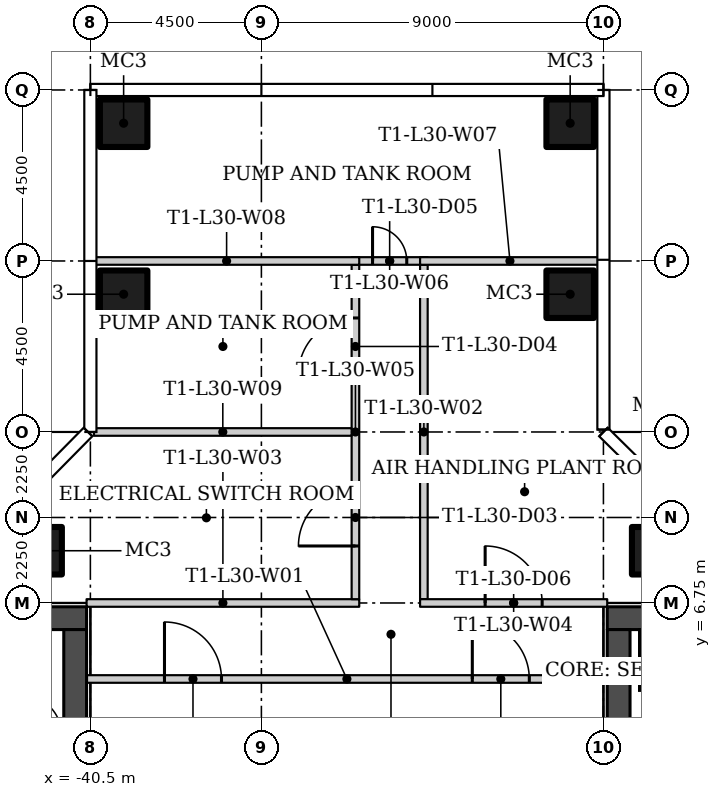
"""IFC4 building model, lengths in metres.
Left out: names, types, materials, properties, quantities, classifications, styles, units other than length and angle.
Written with IfcOpenShell. Run it as: python <this file> out.ifc"""

import sys

from ifc_helpers import new_model, si_unit, direction, frame, frame_2d, origin, origin_2d, place, context, subcontext, project, spatial, rectangle, hollow_rectangle, extrude, element, fill, save


model = new_model("IFC4")
c1 = context("Model", 3, precision=1e-05, world=origin(), true_north=direction((0.0, 1.0)))
c2 = subcontext(c1, "Body", "Model", "MODEL_VIEW")
j1 = project(units=[si_unit("LENGTHUNIT", "METRE"), si_unit("PLANEANGLEUNIT", "RADIAN")], contexts=[c1])
p1 = place(None, origin())
s1 = spatial("IfcSite", under=j1, at=p1, CompositionType="ELEMENT")
p2 = place(p1, origin())
s2 = spatial("IfcBuilding", under=s1, at=p2, CompositionType="ELEMENT")
p3 = place(p2, frame((0.0, 0.0, 128.7)))
s3 = spatial("IfcBuildingStorey", under=s2, at=p3, CompositionType="ELEMENT", Elevation=128.7)
for number, where in (
    (1, (-25.625, 8.125, 0.0)),
    (2, (-41.875, 8.125, 0.0)),
    (3, (-39.625, 14.875, 0.0)),
    (4, (-39.625, 19.375, 0.0)),
    (5, (-27.875, 14.875, 0.0)),
    (6, (-27.875, 19.375, 0.0)),
):
    element("IfcColumn", number, at=place(p3, frame(where)), inside=s3, PredefinedType="COLUMN", context=c2, shape_type="SweptSolid", body=[
        extrude(hollow_rectangle(XDim=1.25, YDim=1.25, WallThickness=0.05, at=origin_2d()), origin(), (0.0, 0.0, 1.0), 4.4),
    ])
p4 = place(p3, frame((-40.6, 4.75, 0.0)))
e7 = element("IfcWall", 7, at=p4, inside=s3, PredefinedType="PARTITIONING", context=c2, shape_type="SweptSolid", body=[
    extrude(rectangle(XDim=13.7, YDim=0.2, at=frame_2d((6.85, 0.0))), origin(), (0.0, 0.0, 1.0), 4.4),
])
p5 = place(p4, frame((2.05, 0.0, 0.0)))
e8 = element("IfcOpeningElement", 8, at=p5, cuts=e7, PredefinedType="OPENING", context=c2, shape_type="SweptSolid", body=[
    extrude(rectangle(XDim=1.5, YDim=2.4, at=frame_2d((0.75, 1.2))), frame((0.0, 0.11, 0.0), z_axis=(0.0, -1.0, 0.0), x_axis=(1.0, 0.0, 0.0)), (0.0, 0.0, 1.0), 0.22),
])
p6 = place(p4, frame((10.15, 0.0, 0.0)))
e9 = element("IfcOpeningElement", 9, at=p6, cuts=e7, PredefinedType="OPENING", context=c2, shape_type="SweptSolid", body=[
    extrude(rectangle(XDim=1.5, YDim=2.4, at=frame_2d((0.75, 1.2))), frame((0.0, 0.11, 0.0), z_axis=(0.0, -1.0, 0.0), x_axis=(1.0, 0.0, 0.0)), (0.0, 0.0, 1.0), 0.22),
])
p7 = place(p3, frame((-31.725, 15.65, 0.0), z_axis=(0.0, 0.0, 1.0), x_axis=(0.0, -1.0, 0.0)))
e10 = element("IfcWall", 10, at=p7, inside=s3, PredefinedType="PARTITIONING", context=c2, shape_type="SweptSolid", body=[
    extrude(rectangle(XDim=8.8, YDim=0.2, at=frame_2d((4.4, 0.0))), origin(), (0.0, 0.0, 1.0), 4.4),
])
p8 = place(p3, frame((-40.6, 6.75, 0.0)))
e11 = element("IfcWall", 11, at=p8, inside=s3, PredefinedType="PARTITIONING", context=c2, shape_type="SweptSolid", body=[
    extrude(rectangle(XDim=7.175, YDim=0.2, at=frame_2d((3.587, 0.0))), origin(), (0.0, 0.0, 1.0), 4.4),
])
p9 = place(p3, frame((-31.825, 6.75, 0.0)))
e12 = element("IfcWall", 12, at=p9, inside=s3, PredefinedType="PARTITIONING", context=c2, shape_type="SweptSolid", body=[
    extrude(rectangle(XDim=4.925, YDim=0.2, at=frame_2d((2.462, 0.0))), origin(), (0.0, 0.0, 1.0), 4.4),
])
p10 = place(p9, frame((1.712, 0.0, 0.0)))
e13 = element("IfcOpeningElement", 13, at=p10, cuts=e12, PredefinedType="OPENING", context=c2, shape_type="SweptSolid", body=[
    extrude(rectangle(XDim=1.5, YDim=2.4, at=frame_2d((0.75, 1.2))), frame((0.0, 0.11, 0.0), z_axis=(0.0, -1.0, 0.0), x_axis=(1.0, 0.0, 0.0)), (0.0, 0.0, 1.0), 0.22),
])
p11 = place(p3, frame((-33.525, 6.85, 0.0), z_axis=(0.0, 0.0, 1.0), x_axis=(0.0, 1.0, 0.0)))
e14 = element("IfcWall", 14, at=p11, inside=s3, PredefinedType="PARTITIONING", context=c2, shape_type="SweptSolid", body=[
    extrude(rectangle(XDim=8.8, YDim=0.2, at=frame_2d((4.4, 0.0))), origin(), (0.0, 0.0, 1.0), 4.4),
])
p12 = place(p11, frame((1.4, 0.0, 0.0)))
e15 = element("IfcOpeningElement", 15, at=p12, cuts=e14, PredefinedType="OPENING", context=c2, shape_type="SweptSolid", body=[
    extrude(rectangle(XDim=1.5, YDim=2.4, at=frame_2d((0.75, 1.2))), frame((0.0, 0.11, 0.0), z_axis=(0.0, -1.0, 0.0), x_axis=(1.0, 0.0, 0.0)), (0.0, 0.0, 1.0), 0.22),
])
p13 = place(p11, frame((5.9, 0.0, 0.0)))
e16 = element("IfcOpeningElement", 16, at=p13, cuts=e14, PredefinedType="OPENING", context=c2, shape_type="SweptSolid", body=[
    extrude(rectangle(XDim=1.5, YDim=2.4, at=frame_2d((0.75, 1.2))), frame((0.0, 0.11, 0.0), z_axis=(0.0, -1.0, 0.0), x_axis=(1.0, 0.0, 0.0)), (0.0, 0.0, 1.0), 0.22),
])
p14 = place(p3, frame((-33.625, 15.75, 0.0)))
e17 = element("IfcWall", 17, at=p14, inside=s3, PredefinedType="PARTITIONING", context=c2, shape_type="SweptSolid", body=[
    extrude(rectangle(XDim=2.001, YDim=0.2, at=frame_2d((1.0, 0.0))), origin(), (0.0, 0.0, 1.0), 4.4),
])
p15 = place(p14, frame((0.55, 0.0, 0.0)))
e18 = element("IfcOpeningElement", 18, at=p15, cuts=e17, PredefinedType="OPENING", context=c2, shape_type="SweptSolid", body=[
    extrude(rectangle(XDim=0.9, YDim=2.4, at=frame_2d((0.45, 1.2))), frame((0.0, 0.11, 0.0), z_axis=(0.0, -1.0, 0.0), x_axis=(1.0, 0.0, 0.0)), (0.0, 0.0, 1.0), 0.22),
])
p16 = place(p3, frame((-27.095, 15.75, 0.0), z_axis=(0.0, 0.0, 1.0), x_axis=(-1.0, 0.0, 0.0)))
e19 = element("IfcWall", 19, at=p16, inside=s3, PredefinedType="PARTITIONING", context=c2, shape_type="SweptSolid", body=[
    extrude(rectangle(XDim=4.73, YDim=0.2, at=frame_2d((2.365, 0.0))), origin(), (0.0, 0.0, 1.0), 4.4),
])
p17 = place(p3, frame((-33.425, 15.75, 0.0), z_axis=(0.0, 0.0, 1.0), x_axis=(-1.0, 0.0, 0.0)))
e20 = element("IfcWall", 20, at=p17, inside=s3, PredefinedType="PARTITIONING", context=c2, shape_type="SweptSolid", body=[
    extrude(rectangle(XDim=6.98, YDim=0.2, at=frame_2d((3.49, 0.0))), origin(), (0.0, 0.0, 1.0), 4.4),
])
p18 = place(p3, frame((-33.625, 11.25, 0.0), z_axis=(0.0, 0.0, 1.0), x_axis=(-1.0, 0.0, 0.0)))
e21 = element("IfcWall", 21, at=p18, inside=s3, PredefinedType="PARTITIONING", context=c2, shape_type="SweptSolid", body=[
    extrude(rectangle(XDim=6.78, YDim=0.2, at=frame_2d((3.39, 0.0))), origin(), (0.0, 0.0, 1.0), 4.4),
])
p19 = place(p3, frame((-26.9, 6.35, 0.0)))
e22 = element("IfcWall", 22, at=p19, inside=s3, PredefinedType="SHEAR", context=c2, shape_type="SweptSolid", body=[
    extrude(rectangle(XDim=13.3, YDim=0.6, at=frame_2d((6.65, 0.0))), origin(), (0.0, 0.0, 1.0), 4.4),
])
p20 = place(p3, frame((-26.6, 6.05, 0.0), z_axis=(0.0, 0.0, 1.0), x_axis=(0.0, -1.0, 0.0)))
e23 = element("IfcWall", 23, at=p20, inside=s3, PredefinedType="SHEAR", context=c2, shape_type="SweptSolid", body=[
    extrude(rectangle(XDim=12.1, YDim=0.6, at=frame_2d((6.05, 0.0))), origin(), (0.0, 0.0, 1.0), 4.4),
])
p21 = place(p20, frame((7.45, 0.0, 0.0)))
e24 = element("IfcOpeningElement", 24, at=p21, cuts=e23, PredefinedType="OPENING", context=c2, shape_type="SweptSolid", body=[
    extrude(rectangle(XDim=1.2, YDim=2.1, at=frame_2d((0.6, 1.05))), frame((0.0, 0.31, 0.0), z_axis=(0.0, -1.0, 0.0), x_axis=(1.0, 0.0, 0.0)), (0.0, 0.0, 1.0), 0.62),
])
p22 = place(p20, frame((3.9, 0.0, 0.0)))
e25 = element("IfcOpeningElement", 25, at=p22, cuts=e23, PredefinedType="OPENING", context=c2, shape_type="SweptSolid", body=[
    extrude(rectangle(XDim=1.8, YDim=2.4, at=frame_2d((0.9, 1.2))), frame((0.0, 0.31, 0.0), z_axis=(0.0, -1.0, 0.0), x_axis=(1.0, 0.0, 0.0)), (0.0, 0.0, 1.0), 0.62),
])
p23 = place(p3, frame((-40.6, 6.35, 0.0), z_axis=(0.0, 0.0, 1.0), x_axis=(-1.0, 0.0, 0.0)))
e26 = element("IfcWall", 26, at=p23, inside=s3, PredefinedType="SHEAR", context=c2, shape_type="SweptSolid", body=[
    extrude(rectangle(XDim=13.3, YDim=0.6, at=frame_2d((6.65, 0.0))), origin(), (0.0, 0.0, 1.0), 4.4),
])
p24 = place(p3, frame((-40.9, -6.05, 0.0), z_axis=(0.0, 0.0, 1.0), x_axis=(0.0, 1.0, 0.0)))
e27 = element("IfcWall", 27, at=p24, inside=s3, PredefinedType="SHEAR", context=c2, shape_type="SweptSolid", body=[
    extrude(rectangle(XDim=12.1, YDim=0.6, at=frame_2d((6.05, 0.0))), origin(), (0.0, 0.0, 1.0), 4.4),
])
p25 = place(p24, frame((3.45, 0.0, 0.0)))
e28 = element("IfcOpeningElement", 28, at=p25, cuts=e27, PredefinedType="OPENING", context=c2, shape_type="SweptSolid", body=[
    extrude(rectangle(XDim=1.2, YDim=2.1, at=frame_2d((0.6, 1.05))), frame((0.0, 0.31, 0.0), z_axis=(0.0, -1.0, 0.0), x_axis=(1.0, 0.0, 0.0)), (0.0, 0.0, 1.0), 0.62),
])
p26 = place(p24, frame((6.4, 0.0, 0.0)))
e29 = element("IfcOpeningElement", 29, at=p26, cuts=e27, PredefinedType="OPENING", context=c2, shape_type="SweptSolid", body=[
    extrude(rectangle(XDim=1.8, YDim=2.4, at=frame_2d((0.9, 1.2))), frame((0.0, 0.31, 0.0), z_axis=(0.0, -1.0, 0.0), x_axis=(1.0, 0.0, 0.0)), (0.0, 0.0, 1.0), 0.62),
])
p27 = place(p5, origin())
e30 = element("IfcDoor", 30, at=p27, inside=s3, OperationType="DOUBLE_DOOR_SINGLE_SWING", PredefinedType="DOOR", context=c2, shape_type="SweptSolid", body=[
    extrude(rectangle(XDim=1.5, YDim=2.4, at=frame_2d((0.75, 1.2))), frame((0.0, 0.025, 0.0), z_axis=(0.0, -1.0, 0.0), x_axis=(1.0, 0.0, 0.0)), (0.0, 0.0, 1.0), 0.05),
])
fill(e8, e30)
p28 = place(p6, origin())
e31 = element("IfcDoor", 31, at=p28, inside=s3, OperationType="DOUBLE_DOOR_SINGLE_SWING", PredefinedType="DOOR", context=c2, shape_type="SweptSolid", body=[
    extrude(rectangle(XDim=1.5, YDim=2.4, at=frame_2d((0.75, 1.2))), frame((0.0, 0.025, 0.0), z_axis=(0.0, -1.0, 0.0), x_axis=(1.0, 0.0, 0.0)), (0.0, 0.0, 1.0), 0.05),
])
fill(e9, e31)
p29 = place(p12, origin())
e32 = element("IfcDoor", 32, at=p29, inside=s3, OperationType="DOUBLE_DOOR_SINGLE_SWING", PredefinedType="DOOR", context=c2, shape_type="SweptSolid", body=[
    extrude(rectangle(XDim=1.5, YDim=2.4, at=frame_2d((0.75, 1.2))), frame((0.0, 0.025, 0.0), z_axis=(0.0, -1.0, 0.0), x_axis=(1.0, 0.0, 0.0)), (0.0, 0.0, 1.0), 0.05),
])
fill(e15, e32)
p30 = place(p13, origin())
e33 = element("IfcDoor", 33, at=p30, inside=s3, OperationType="DOUBLE_DOOR_SINGLE_SWING", PredefinedType="DOOR", context=c2, shape_type="SweptSolid", body=[
    extrude(rectangle(XDim=1.5, YDim=2.4, at=frame_2d((0.75, 1.2))), frame((0.0, 0.025, 0.0), z_axis=(0.0, -1.0, 0.0), x_axis=(1.0, 0.0, 0.0)), (0.0, 0.0, 1.0), 0.05),
])
fill(e16, e33)
p31 = place(p15, origin())
e34 = element("IfcDoor", 34, at=p31, inside=s3, OperationType="SINGLE_SWING_RIGHT", PredefinedType="DOOR", context=c2, shape_type="SweptSolid", body=[
    extrude(rectangle(XDim=0.9, YDim=2.4, at=frame_2d((0.45, 1.2))), frame((0.0, 0.025, 0.0), z_axis=(0.0, -1.0, 0.0), x_axis=(1.0, 0.0, 0.0)), (0.0, 0.0, 1.0), 0.05),
])
fill(e18, e34)
p32 = place(p10, origin())
e35 = element("IfcDoor", 35, at=p32, inside=s3, OperationType="DOUBLE_DOOR_SINGLE_SWING", PredefinedType="DOOR", context=c2, shape_type="SweptSolid", body=[
    extrude(rectangle(XDim=1.5, YDim=2.4, at=frame_2d((0.75, 1.2))), frame((0.0, 0.025, 0.0), z_axis=(0.0, -1.0, 0.0), x_axis=(1.0, 0.0, 0.0)), (0.0, 0.0, 1.0), 0.05),
])
fill(e13, e35)
save(model, sys.argv[1])
